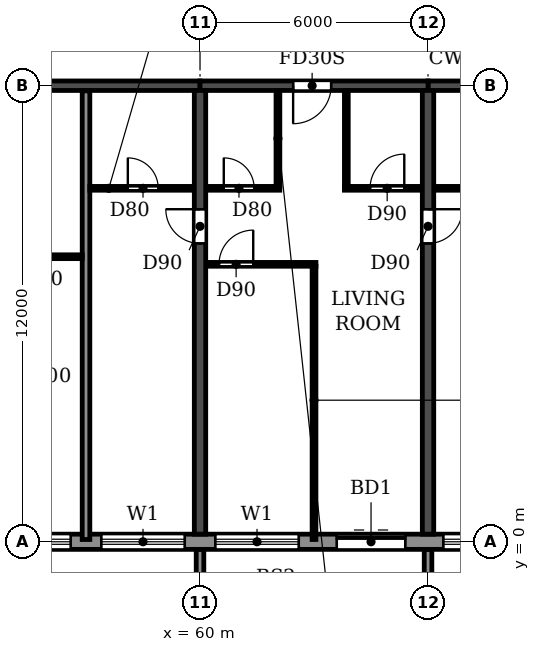
"""IFC4 building model, lengths in metres.
Left out: names, types, materials, properties, quantities, classifications, styles, units other than length and angle.
Written with IfcOpenShell. Run it as: python <this file> out.ifc"""

import sys

from ifc_helpers import new_model, si_unit, direction, frame, frame_2d, origin, place, context, subcontext, project, spatial, polyline, rectangle, outline, extrude, source, transform, mapped, element, fill, save


model = new_model("IFC4")
c1 = context("Model", 3, precision=1e-05, world=origin(), true_north=direction((0.0, 1.0)))
c2 = subcontext(c1, "Body", "Model", "MODEL_VIEW")
j1 = project(units=[si_unit("LENGTHUNIT", "METRE"), si_unit("PLANEANGLEUNIT", "RADIAN")], contexts=[c1])
p1 = place(None, origin())
s1 = spatial("IfcSite", under=j1, at=p1, CompositionType="ELEMENT")
p2 = place(p1, origin())
s2 = spatial("IfcBuilding", under=s1, at=p2, CompositionType="ELEMENT")
p3 = place(p2, frame((0.0, 0.0, 132.3)))
s3 = spatial("IfcBuildingStorey", under=s2, at=p3, CompositionType="ELEMENT", Elevation=132.3)
p4 = place(p3, frame((60.0, 0.2, 0.0), z_axis=(0.0, 0.0, 1.0), x_axis=(0.0, 1.0, 0.0)))
e1 = element("IfcWall", 1, at=p4, inside=s3, PredefinedType="SHEAR", context=c2, shape_type="SweptSolid", body=[
    extrude(rectangle(XDim=11.675, YDim=0.3, at=frame_2d((5.837, 0.0))), origin(), (0.0, 0.0, 1.0), 3.07),
])
p5 = place(p4, frame((7.65, 0.0, 0.0)))
e2 = element("IfcOpeningElement", 2, at=p5, cuts=e1, PredefinedType="OPENING", context=c2, shape_type="SweptSolid", body=[
    extrude(rectangle(XDim=0.9, YDim=2.1, at=frame_2d((0.45, 1.05))), frame((0.0, 0.16, 0.0), z_axis=(0.0, -1.0, 0.0), x_axis=(1.0, 0.0, 0.0)), (0.0, 0.0, 1.0), 0.32),
])
p6 = place(p3, frame((66.0, 0.2, 0.0), z_axis=(0.0, 0.0, 1.0), x_axis=(0.0, 1.0, 0.0)))
e3 = element("IfcWall", 3, at=p6, inside=s3, PredefinedType="SHEAR", context=c2, shape_type="SweptSolid", body=[
    extrude(rectangle(XDim=11.675, YDim=0.3, at=frame_2d((5.837, 0.0))), origin(), (0.0, 0.0, 1.0), 3.07),
])
p7 = place(p6, frame((7.65, 0.0, 0.0)))
e4 = element("IfcOpeningElement", 4, at=p7, cuts=e3, PredefinedType="OPENING", context=c2, shape_type="SweptSolid", body=[
    extrude(rectangle(XDim=0.9, YDim=2.1, at=frame_2d((0.45, 1.05))), frame((0.0, 0.16, 0.0), z_axis=(0.0, -1.0, 0.0), x_axis=(1.0, 0.0, 0.0)), (0.0, 0.0, 1.0), 0.32),
])
p8 = place(p3, frame((54.0, 12.0, 0.0), z_axis=(0.0, 0.0, 1.0), x_axis=(1.0, 0.0, 0.0)))
e5 = element("IfcWall", 5, at=p8, inside=s3, PredefinedType="SHEAR", context=c2, shape_type="SweptSolid", body=[
    extrude(rectangle(XDim=6.0, YDim=0.25, at=frame_2d((3.0, 0.0))), origin(), (0.0, 0.0, 1.0), 2.47),
])
p9 = place(p3, frame((60.0, 12.0, 0.0), z_axis=(0.0, 0.0, 1.0), x_axis=(1.0, 0.0, 0.0)))
e6 = element("IfcWall", 6, at=p9, inside=s3, PredefinedType="SHEAR", context=c2, shape_type="SweptSolid", body=[
    extrude(rectangle(XDim=6.0, YDim=0.25, at=frame_2d((3.0, 0.0))), origin(), (0.0, 0.0, 1.0), 2.47),
])
p10 = place(p9, frame((2.45, 0.0, 0.0)))
e7 = element("IfcOpeningElement", 7, at=p10, cuts=e6, PredefinedType="OPENING", context=c2, shape_type="SweptSolid", body=[
    extrude(rectangle(XDim=1.0, YDim=2.1, at=frame_2d((0.5, 1.05))), frame((0.0, 0.135, 0.0), z_axis=(0.0, -1.0, 0.0), x_axis=(1.0, 0.0, 0.0)), (0.0, 0.0, 1.0), 0.27),
])
p11 = place(p3, frame((66.0, 12.0, 0.0), z_axis=(0.0, 0.0, 1.0), x_axis=(1.0, 0.0, 0.0)))
e8 = element("IfcWall", 8, at=p11, inside=s3, PredefinedType="SHEAR", context=c2, shape_type="SweptSolid", body=[
    extrude(rectangle(XDim=6.0, YDim=0.25, at=frame_2d((3.0, 0.0))), origin(), (0.0, 0.0, 1.0), 2.47),
])
p12 = place(p3, frame((16.683, 0.0, 0.0), z_axis=(0.0, 0.0, 1.0), x_axis=(1.0, 0.0, 0.0)))
e9 = element("IfcWall", 9, at=p12, inside=s3, PredefinedType="STANDARD", context=c2, shape_type="SweptSolid", body=[
    extrude(rectangle(XDim=68.634, YDim=0.4, at=frame_2d((34.317, 0.0))), origin(), (0.0, 0.0, 1.0), 3.07),
])
p13 = place(p12, frame((1.717, 0.0, 0.9)))
e10 = element("IfcOpeningElement", 10, at=p13, cuts=e9, PredefinedType="OPENING", context=c2, shape_type="SweptSolid", body=[
    extrude(rectangle(XDim=2.2, YDim=1.5, at=frame_2d((1.1, 0.75))), frame((0.0, 0.21, 0.0), z_axis=(0.0, -1.0, 0.0), x_axis=(1.0, 0.0, 0.0)), (0.0, 0.0, 1.0), 0.42),
])
p14 = place(p12, frame((4.717, 0.0, 0.9)))
e11 = element("IfcOpeningElement", 11, at=p14, cuts=e9, PredefinedType="OPENING", context=c2, shape_type="SweptSolid", body=[
    extrude(rectangle(XDim=2.2, YDim=1.5, at=frame_2d((1.1, 0.75))), frame((0.0, 0.21, 0.0), z_axis=(0.0, -1.0, 0.0), x_axis=(1.0, 0.0, 0.0)), (0.0, 0.0, 1.0), 0.42),
])
p15 = place(p12, frame((7.717, 0.0, 0.9)))
e12 = element("IfcOpeningElement", 12, at=p15, cuts=e9, PredefinedType="OPENING", context=c2, shape_type="SweptSolid", body=[
    extrude(rectangle(XDim=2.2, YDim=1.5, at=frame_2d((1.1, 0.75))), frame((0.0, 0.21, 0.0), z_axis=(0.0, -1.0, 0.0), x_axis=(1.0, 0.0, 0.0)), (0.0, 0.0, 1.0), 0.42),
])
p16 = place(p12, frame((10.917, 0.0, 0.0)))
e13 = element("IfcOpeningElement", 13, at=p16, cuts=e9, PredefinedType="OPENING", context=c2, shape_type="SweptSolid", body=[
    extrude(rectangle(XDim=1.8, YDim=2.4, at=frame_2d((0.9, 1.2))), frame((0.0, 0.21, 0.0), z_axis=(0.0, -1.0, 0.0), x_axis=(1.0, 0.0, 0.0)), (0.0, 0.0, 1.0), 0.42),
])
p17 = place(p12, frame((13.717, 0.0, 0.9)))
e14 = element("IfcOpeningElement", 14, at=p17, cuts=e9, PredefinedType="OPENING", context=c2, shape_type="SweptSolid", body=[
    extrude(rectangle(XDim=2.2, YDim=1.5, at=frame_2d((1.1, 0.75))), frame((0.0, 0.21, 0.0), z_axis=(0.0, -1.0, 0.0), x_axis=(1.0, 0.0, 0.0)), (0.0, 0.0, 1.0), 0.42),
])
p18 = place(p12, frame((16.717, 0.0, 0.9)))
e15 = element("IfcOpeningElement", 15, at=p18, cuts=e9, PredefinedType="OPENING", context=c2, shape_type="SweptSolid", body=[
    extrude(rectangle(XDim=2.2, YDim=1.5, at=frame_2d((1.1, 0.75))), frame((0.0, 0.21, 0.0), z_axis=(0.0, -1.0, 0.0), x_axis=(1.0, 0.0, 0.0)), (0.0, 0.0, 1.0), 0.42),
])
p19 = place(p12, frame((19.917, 0.0, 0.0)))
e16 = element("IfcOpeningElement", 16, at=p19, cuts=e9, PredefinedType="OPENING", context=c2, shape_type="SweptSolid", body=[
    extrude(rectangle(XDim=1.8, YDim=2.4, at=frame_2d((0.9, 1.2))), frame((0.0, 0.21, 0.0), z_axis=(0.0, -1.0, 0.0), x_axis=(1.0, 0.0, 0.0)), (0.0, 0.0, 1.0), 0.42),
])
p20 = place(p12, frame((22.717, 0.0, 0.9)))
e17 = element("IfcOpeningElement", 17, at=p20, cuts=e9, PredefinedType="OPENING", context=c2, shape_type="SweptSolid", body=[
    extrude(rectangle(XDim=2.2, YDim=1.5, at=frame_2d((1.1, 0.75))), frame((0.0, 0.21, 0.0), z_axis=(0.0, -1.0, 0.0), x_axis=(1.0, 0.0, 0.0)), (0.0, 0.0, 1.0), 0.42),
])
p21 = place(p12, frame((25.717, 0.0, 0.9)))
e18 = element("IfcOpeningElement", 18, at=p21, cuts=e9, PredefinedType="OPENING", context=c2, shape_type="SweptSolid", body=[
    extrude(rectangle(XDim=2.2, YDim=1.5, at=frame_2d((1.1, 0.75))), frame((0.0, 0.21, 0.0), z_axis=(0.0, -1.0, 0.0), x_axis=(1.0, 0.0, 0.0)), (0.0, 0.0, 1.0), 0.42),
])
p22 = place(p12, frame((28.717, 0.0, 0.9)))
e19 = element("IfcOpeningElement", 19, at=p22, cuts=e9, PredefinedType="OPENING", context=c2, shape_type="SweptSolid", body=[
    extrude(rectangle(XDim=2.2, YDim=1.5, at=frame_2d((1.1, 0.75))), frame((0.0, 0.21, 0.0), z_axis=(0.0, -1.0, 0.0), x_axis=(1.0, 0.0, 0.0)), (0.0, 0.0, 1.0), 0.42),
])
p23 = place(p12, frame((31.917, 0.0, 0.0)))
e20 = element("IfcOpeningElement", 20, at=p23, cuts=e9, PredefinedType="OPENING", context=c2, shape_type="SweptSolid", body=[
    extrude(rectangle(XDim=1.8, YDim=2.4, at=frame_2d((0.9, 1.2))), frame((0.0, 0.21, 0.0), z_axis=(0.0, -1.0, 0.0), x_axis=(1.0, 0.0, 0.0)), (0.0, 0.0, 1.0), 0.42),
])
p24 = place(p12, frame((34.717, 0.0, 0.9)))
e21 = element("IfcOpeningElement", 21, at=p24, cuts=e9, PredefinedType="OPENING", context=c2, shape_type="SweptSolid", body=[
    extrude(rectangle(XDim=2.2, YDim=1.5, at=frame_2d((1.1, 0.75))), frame((0.0, 0.21, 0.0), z_axis=(0.0, -1.0, 0.0), x_axis=(1.0, 0.0, 0.0)), (0.0, 0.0, 1.0), 0.42),
])
p25 = place(p12, frame((37.717, 0.0, 0.9)))
e22 = element("IfcOpeningElement", 22, at=p25, cuts=e9, PredefinedType="OPENING", context=c2, shape_type="SweptSolid", body=[
    extrude(rectangle(XDim=2.2, YDim=1.5, at=frame_2d((1.1, 0.75))), frame((0.0, 0.21, 0.0), z_axis=(0.0, -1.0, 0.0), x_axis=(1.0, 0.0, 0.0)), (0.0, 0.0, 1.0), 0.42),
])
p26 = place(p12, frame((40.717, 0.0, 0.9)))
e23 = element("IfcOpeningElement", 23, at=p26, cuts=e9, PredefinedType="OPENING", context=c2, shape_type="SweptSolid", body=[
    extrude(rectangle(XDim=2.2, YDim=1.5, at=frame_2d((1.1, 0.75))), frame((0.0, 0.21, 0.0), z_axis=(0.0, -1.0, 0.0), x_axis=(1.0, 0.0, 0.0)), (0.0, 0.0, 1.0), 0.42),
])
p27 = place(p12, frame((43.717, 0.0, 0.9)))
e24 = element("IfcOpeningElement", 24, at=p27, cuts=e9, PredefinedType="OPENING", context=c2, shape_type="SweptSolid", body=[
    extrude(rectangle(XDim=2.2, YDim=1.5, at=frame_2d((1.1, 0.75))), frame((0.0, 0.21, 0.0), z_axis=(0.0, -1.0, 0.0), x_axis=(1.0, 0.0, 0.0)), (0.0, 0.0, 1.0), 0.42),
])
p28 = place(p12, frame((46.917, 0.0, 0.0)))
e25 = element("IfcOpeningElement", 25, at=p28, cuts=e9, PredefinedType="OPENING", context=c2, shape_type="SweptSolid", body=[
    extrude(rectangle(XDim=1.8, YDim=2.4, at=frame_2d((0.9, 1.2))), frame((0.0, 0.21, 0.0), z_axis=(0.0, -1.0, 0.0), x_axis=(1.0, 0.0, 0.0)), (0.0, 0.0, 1.0), 0.42),
])
p29 = place(p12, frame((49.717, 0.0, 0.9)))
e26 = element("IfcOpeningElement", 26, at=p29, cuts=e9, PredefinedType="OPENING", context=c2, shape_type="SweptSolid", body=[
    extrude(rectangle(XDim=2.2, YDim=1.5, at=frame_2d((1.1, 0.75))), frame((0.0, 0.21, 0.0), z_axis=(0.0, -1.0, 0.0), x_axis=(1.0, 0.0, 0.0)), (0.0, 0.0, 1.0), 0.42),
])
p30 = place(p12, frame((52.717, 0.0, 0.9)))
e27 = element("IfcOpeningElement", 27, at=p30, cuts=e9, PredefinedType="OPENING", context=c2, shape_type="SweptSolid", body=[
    extrude(rectangle(XDim=2.2, YDim=1.5, at=frame_2d((1.1, 0.75))), frame((0.0, 0.21, 0.0), z_axis=(0.0, -1.0, 0.0), x_axis=(1.0, 0.0, 0.0)), (0.0, 0.0, 1.0), 0.42),
])
p31 = place(p12, frame((55.717, 0.0, 0.9)))
e28 = element("IfcOpeningElement", 28, at=p31, cuts=e9, PredefinedType="OPENING", context=c2, shape_type="SweptSolid", body=[
    extrude(rectangle(XDim=2.2, YDim=1.5, at=frame_2d((1.1, 0.75))), frame((0.0, 0.21, 0.0), z_axis=(0.0, -1.0, 0.0), x_axis=(1.0, 0.0, 0.0)), (0.0, 0.0, 1.0), 0.42),
])
p32 = place(p12, frame((58.917, 0.0, 0.0)))
e29 = element("IfcOpeningElement", 29, at=p32, cuts=e9, PredefinedType="OPENING", context=c2, shape_type="SweptSolid", body=[
    extrude(rectangle(XDim=1.8, YDim=2.4, at=frame_2d((0.9, 1.2))), frame((0.0, 0.21, 0.0), z_axis=(0.0, -1.0, 0.0), x_axis=(1.0, 0.0, 0.0)), (0.0, 0.0, 1.0), 0.42),
])
p33 = place(p12, frame((61.717, 0.0, 0.9)))
e30 = element("IfcOpeningElement", 30, at=p33, cuts=e9, PredefinedType="OPENING", context=c2, shape_type="SweptSolid", body=[
    extrude(rectangle(XDim=2.2, YDim=1.5, at=frame_2d((1.1, 0.75))), frame((0.0, 0.21, 0.0), z_axis=(0.0, -1.0, 0.0), x_axis=(1.0, 0.0, 0.0)), (0.0, 0.0, 1.0), 0.42),
])
p34 = place(p12, frame((64.717, 0.0, 0.9)))
e31 = element("IfcOpeningElement", 31, at=p34, cuts=e9, PredefinedType="OPENING", context=c2, shape_type="SweptSolid", body=[
    extrude(rectangle(XDim=2.2, YDim=1.5, at=frame_2d((1.1, 0.75))), frame((0.0, 0.21, 0.0), z_axis=(0.0, -1.0, 0.0), x_axis=(1.0, 0.0, 0.0)), (0.0, 0.0, 1.0), 0.42),
])
m1 = source(origin(), c2, "Body", "SweptSolid", [
    extrude(outline(polyline([(0.0, 0.0), (0.2, 0.0), (0.2, 1.65), (0.0, 1.65), (0.0, 0.0)])), origin(), (0.0, 0.0, 1.0), 3.1),
])
for number, where in (
    (32, (59.9, -1.85, 0.0)),
    (33, (65.9, -1.85, 0.0)),
):
    element("IfcWall", number, at=place(p3, frame(where)), inside=s3, PredefinedType="STANDARD", context=c2, shape_type="MappedRepresentation", body=[
        mapped(m1, transform((0.0, 0.0, 0.0))),
    ])
p35 = place(p3, frame((57.0, 0.06, 0.0), z_axis=(0.0, 0.0, 1.0), x_axis=(0.0, 1.0, 0.0)))
e34 = element("IfcWall", 34, at=p35, inside=s3, PredefinedType="PARTITIONING", context=c2, shape_type="SweptSolid", body=[
    extrude(rectangle(XDim=11.805, YDim=0.2, at=frame_2d((5.902, 0.0))), origin(), (0.0, 0.0, 1.0), 3.07),
])
p36 = place(p3, frame((60.16, 7.3, 0.0), z_axis=(0.0, 0.0, 1.0), x_axis=(1.0, 0.0, 0.0)))
e35 = element("IfcWall", 35, at=p36, inside=s3, PredefinedType="PARTITIONING", context=c2, shape_type="SweptSolid", body=[
    extrude(rectangle(XDim=2.89, YDim=0.1, at=frame_2d((1.445, 0.0))), origin(), (0.0, 0.0, 1.0), 3.07),
])
p37 = place(p36, frame((0.34, 0.0, 0.0)))
e36 = element("IfcOpeningElement", 36, at=p37, cuts=e35, PredefinedType="OPENING", context=c2, shape_type="SweptSolid", body=[
    extrude(rectangle(XDim=0.9, YDim=2.1, at=frame_2d((0.45, 1.05))), frame((0.0, 0.06, 0.0), z_axis=(0.0, -1.0, 0.0), x_axis=(1.0, 0.0, 0.0)), (0.0, 0.0, 1.0), 0.12),
])
p38 = place(p3, frame((54.16, 7.5, 0.0), z_axis=(0.0, 0.0, 1.0), x_axis=(1.0, 0.0, 0.0)))
e37 = element("IfcWall", 37, at=p38, inside=s3, PredefinedType="PARTITIONING", context=c2, shape_type="SweptSolid", body=[
    extrude(rectangle(XDim=2.74, YDim=0.1, at=frame_2d((1.37, 0.0))), origin(), (0.0, 0.0, 1.0), 3.07),
])
p39 = place(p38, frame((0.94, 0.0, 0.0)))
e38 = element("IfcOpeningElement", 38, at=p39, cuts=e37, PredefinedType="OPENING", context=c2, shape_type="SweptSolid", body=[
    extrude(rectangle(XDim=0.8, YDim=2.1, at=frame_2d((0.4, 1.05))), frame((0.0, 0.06, 0.0), z_axis=(0.0, -1.0, 0.0), x_axis=(1.0, 0.0, 0.0)), (0.0, 0.0, 1.0), 0.12),
])
p40 = place(p3, frame((57.1, 9.3, 0.0), z_axis=(0.0, 0.0, 1.0), x_axis=(1.0, 0.0, 0.0)))
e39 = element("IfcWall", 39, at=p40, inside=s3, PredefinedType="PARTITIONING", context=c2, shape_type="SweptSolid", body=[
    extrude(rectangle(XDim=2.74, YDim=0.1, at=frame_2d((1.37, 0.0))), origin(), (0.0, 0.0, 1.0), 3.07),
])
p41 = place(p40, frame((1.0, 0.0, 0.0)))
e40 = element("IfcOpeningElement", 40, at=p41, cuts=e39, PredefinedType="OPENING", context=c2, shape_type="SweptSolid", body=[
    extrude(rectangle(XDim=0.8, YDim=2.1, at=frame_2d((0.4, 1.05))), frame((0.0, 0.06, 0.0), z_axis=(0.0, -1.0, 0.0), x_axis=(1.0, 0.0, 0.0)), (0.0, 0.0, 1.0), 0.12),
])
p42 = place(p3, frame((60.16, 9.3, 0.0), z_axis=(0.0, 0.0, 1.0), x_axis=(1.0, 0.0, 0.0)))
e41 = element("IfcWall", 41, at=p42, inside=s3, PredefinedType="PARTITIONING", context=c2, shape_type="SweptSolid", body=[
    extrude(rectangle(XDim=1.94, YDim=0.1, at=frame_2d((0.97, 0.0))), origin(), (0.0, 0.0, 1.0), 3.07),
])
p43 = place(p42, frame((0.465, 0.0, 0.0)))
e42 = element("IfcOpeningElement", 42, at=p43, cuts=e41, PredefinedType="OPENING", context=c2, shape_type="SweptSolid", body=[
    extrude(rectangle(XDim=0.8, YDim=2.1, at=frame_2d((0.4, 1.05))), frame((0.0, 0.06, 0.0), z_axis=(0.0, -1.0, 0.0), x_axis=(1.0, 0.0, 0.0)), (0.0, 0.0, 1.0), 0.12),
])
p44 = place(p3, frame((63.8, 9.3, 0.0), z_axis=(0.0, 0.0, 1.0), x_axis=(1.0, 0.0, 0.0)))
e43 = element("IfcWall", 43, at=p44, inside=s3, PredefinedType="PARTITIONING", context=c2, shape_type="SweptSolid", body=[
    extrude(rectangle(XDim=2.04, YDim=0.1, at=frame_2d((1.02, 0.0))), origin(), (0.0, 0.0, 1.0), 3.07),
])
p45 = place(p44, frame((0.675, 0.0, 0.0)))
e44 = element("IfcOpeningElement", 44, at=p45, cuts=e43, PredefinedType="OPENING", context=c2, shape_type="SweptSolid", body=[
    extrude(rectangle(XDim=0.9, YDim=2.1, at=frame_2d((0.45, 1.05))), frame((0.0, 0.06, 0.0), z_axis=(0.0, -1.0, 0.0), x_axis=(1.0, 0.0, 0.0)), (0.0, 0.0, 1.0), 0.12),
])
p46 = place(p3, frame((66.16, 9.3, 0.0), z_axis=(0.0, 0.0, 1.0), x_axis=(1.0, 0.0, 0.0)))
e45 = element("IfcWall", 45, at=p46, inside=s3, PredefinedType="PARTITIONING", context=c2, shape_type="SweptSolid", body=[
    extrude(rectangle(XDim=2.74, YDim=0.1, at=frame_2d((1.37, 0.0))), origin(), (0.0, 0.0, 1.0), 3.07),
])
p47 = place(p46, frame((0.94, 0.0, 0.0)))
e46 = element("IfcOpeningElement", 46, at=p47, cuts=e45, PredefinedType="OPENING", context=c2, shape_type="SweptSolid", body=[
    extrude(rectangle(XDim=0.8, YDim=2.1, at=frame_2d((0.4, 1.05))), frame((0.0, 0.06, 0.0), z_axis=(0.0, -1.0, 0.0), x_axis=(1.0, 0.0, 0.0)), (0.0, 0.0, 1.0), 0.12),
])
p48 = place(p3, frame((62.05, 9.35, 0.0), z_axis=(0.0, 0.0, 1.0), x_axis=(0.0, 1.0, 0.0)))
e47 = element("IfcWall", 47, at=p48, inside=s3, PredefinedType="PARTITIONING", context=c2, shape_type="SweptSolid", body=[
    extrude(rectangle(XDim=2.515, YDim=0.1, at=frame_2d((1.257, 0.0))), origin(), (0.0, 0.0, 1.0), 3.07),
])
p49 = place(p3, frame((63.0, 0.06, 0.0), z_axis=(0.0, 0.0, 1.0), x_axis=(0.0, 1.0, 0.0)))
e48 = element("IfcWall", 48, at=p49, inside=s3, PredefinedType="PARTITIONING", context=c2, shape_type="SweptSolid", body=[
    extrude(rectangle(XDim=7.19, YDim=0.1, at=frame_2d((3.595, 0.0))), origin(), (0.0, 0.0, 1.0), 3.07),
])
p50 = place(p3, frame((63.85, 9.35, 0.0), z_axis=(0.0, 0.0, 1.0), x_axis=(0.0, 1.0, 0.0)))
e49 = element("IfcWall", 49, at=p50, inside=s3, PredefinedType="PARTITIONING", context=c2, shape_type="SweptSolid", body=[
    extrude(rectangle(XDim=2.515, YDim=0.1, at=frame_2d((1.257, 0.0))), origin(), (0.0, 0.0, 1.0), 3.07),
])
p51 = place(p25, origin())
e50 = element("IfcWindow", 50, at=p51, inside=s3, PartitioningType="DOUBLE_PANEL_HORIZONTAL", PredefinedType="WINDOW", context=c2, shape_type="SweptSolid", body=[
    extrude(rectangle(XDim=2.2, YDim=1.5, at=frame_2d((1.1, 0.75))), frame((0.0, 0.03, 0.0), z_axis=(0.0, -1.0, 0.0), x_axis=(1.0, 0.0, 0.0)), (0.0, 0.0, 1.0), 0.06),
])
fill(e22, e50)
p52 = place(p26, origin())
e51 = element("IfcWindow", 51, at=p52, inside=s3, PartitioningType="DOUBLE_PANEL_HORIZONTAL", PredefinedType="WINDOW", context=c2, shape_type="SweptSolid", body=[
    extrude(rectangle(XDim=2.2, YDim=1.5, at=frame_2d((1.1, 0.75))), frame((0.0, 0.03, 0.0), z_axis=(0.0, -1.0, 0.0), x_axis=(1.0, 0.0, 0.0)), (0.0, 0.0, 1.0), 0.06),
])
fill(e23, e51)
p53 = place(p27, origin())
e52 = element("IfcWindow", 52, at=p53, inside=s3, PartitioningType="DOUBLE_PANEL_HORIZONTAL", PredefinedType="WINDOW", context=c2, shape_type="SweptSolid", body=[
    extrude(rectangle(XDim=2.2, YDim=1.5, at=frame_2d((1.1, 0.75))), frame((0.0, 0.03, 0.0), z_axis=(0.0, -1.0, 0.0), x_axis=(1.0, 0.0, 0.0)), (0.0, 0.0, 1.0), 0.06),
])
fill(e24, e52)
p54 = place(p28, origin())
e53 = element("IfcDoor", 53, at=p54, inside=s3, OperationType="DOUBLE_DOOR_SLIDING", PredefinedType="DOOR", context=c2, shape_type="SweptSolid", body=[
    extrude(rectangle(XDim=1.8, YDim=2.4, at=frame_2d((0.9, 1.2))), frame((0.0, 0.025, 0.0), z_axis=(0.0, -1.0, 0.0), x_axis=(1.0, 0.0, 0.0)), (0.0, 0.0, 1.0), 0.05),
])
fill(e25, e53)
p55 = place(p29, origin())
e54 = element("IfcWindow", 54, at=p55, inside=s3, PartitioningType="DOUBLE_PANEL_HORIZONTAL", PredefinedType="WINDOW", context=c2, shape_type="SweptSolid", body=[
    extrude(rectangle(XDim=2.2, YDim=1.5, at=frame_2d((1.1, 0.75))), frame((0.0, 0.03, 0.0), z_axis=(0.0, -1.0, 0.0), x_axis=(1.0, 0.0, 0.0)), (0.0, 0.0, 1.0), 0.06),
])
fill(e26, e54)
p56 = place(p41, origin())
e55 = element("IfcDoor", 55, at=p56, inside=s3, OperationType="SINGLE_SWING_LEFT", PredefinedType="DOOR", context=c2, shape_type="SweptSolid", body=[
    extrude(rectangle(XDim=0.8, YDim=2.1, at=frame_2d((0.4, 1.05))), frame((0.0, 0.025, 0.0), z_axis=(0.0, -1.0, 0.0), x_axis=(1.0, 0.0, 0.0)), (0.0, 0.0, 1.0), 0.05),
])
fill(e40, e55)
p57 = place(p5, origin())
e56 = element("IfcDoor", 56, at=p57, inside=s3, OperationType="SINGLE_SWING_RIGHT", PredefinedType="DOOR", context=c2, shape_type="SweptSolid", body=[
    extrude(rectangle(XDim=0.9, YDim=2.1, at=frame_2d((0.45, 1.05))), frame((0.0, 0.025, 0.0), z_axis=(0.0, -1.0, 0.0), x_axis=(1.0, 0.0, 0.0)), (0.0, 0.0, 1.0), 0.05),
])
fill(e2, e56)
p58 = place(p37, origin())
e57 = element("IfcDoor", 57, at=p58, inside=s3, OperationType="SINGLE_SWING_RIGHT", PredefinedType="DOOR", context=c2, shape_type="SweptSolid", body=[
    extrude(rectangle(XDim=0.9, YDim=2.1, at=frame_2d((0.45, 1.05))), frame((0.0, 0.025, 0.0), z_axis=(0.0, -1.0, 0.0), x_axis=(1.0, 0.0, 0.0)), (0.0, 0.0, 1.0), 0.05),
])
fill(e36, e57)
p59 = place(p43, origin())
e58 = element("IfcDoor", 58, at=p59, inside=s3, OperationType="SINGLE_SWING_LEFT", PredefinedType="DOOR", context=c2, shape_type="SweptSolid", body=[
    extrude(rectangle(XDim=0.8, YDim=2.1, at=frame_2d((0.4, 1.05))), frame((0.0, 0.025, 0.0), z_axis=(0.0, -1.0, 0.0), x_axis=(1.0, 0.0, 0.0)), (0.0, 0.0, 1.0), 0.05),
])
fill(e42, e58)
p60 = place(p10, frame((1.0, 0.0, 0.0), z_axis=(0.0, 0.0, 1.0), x_axis=(-1.0, 0.0, 0.0)))
e59 = element("IfcDoor", 59, at=p60, inside=s3, OperationType="SINGLE_SWING_RIGHT", PredefinedType="DOOR", context=c2, shape_type="SweptSolid", body=[
    extrude(rectangle(XDim=1.0, YDim=2.1, at=frame_2d((0.5, 1.05))), frame((0.0, 0.025, 0.0), z_axis=(0.0, -1.0, 0.0), x_axis=(1.0, 0.0, 0.0)), (0.0, 0.0, 1.0), 0.05),
])
fill(e7, e59)
p61 = place(p45, origin())
e60 = element("IfcDoor", 60, at=p61, inside=s3, OperationType="SINGLE_SWING_RIGHT", PredefinedType="DOOR", context=c2, shape_type="SweptSolid", body=[
    extrude(rectangle(XDim=0.9, YDim=2.1, at=frame_2d((0.45, 1.05))), frame((0.0, 0.025, 0.0), z_axis=(0.0, -1.0, 0.0), x_axis=(1.0, 0.0, 0.0)), (0.0, 0.0, 1.0), 0.05),
])
fill(e44, e60)
p62 = place(p7, frame((0.9, 0.0, 0.0), z_axis=(0.0, 0.0, 1.0), x_axis=(-1.0, 0.0, 0.0)))
e61 = element("IfcDoor", 61, at=p62, inside=s3, OperationType="SINGLE_SWING_LEFT", PredefinedType="DOOR", context=c2, shape_type="SweptSolid", body=[
    extrude(rectangle(XDim=0.9, YDim=2.1, at=frame_2d((0.45, 1.05))), frame((0.0, 0.025, 0.0), z_axis=(0.0, -1.0, 0.0), x_axis=(1.0, 0.0, 0.0)), (0.0, 0.0, 1.0), 0.05),
])
fill(e4, e61)
save(model, sys.argv[1])
